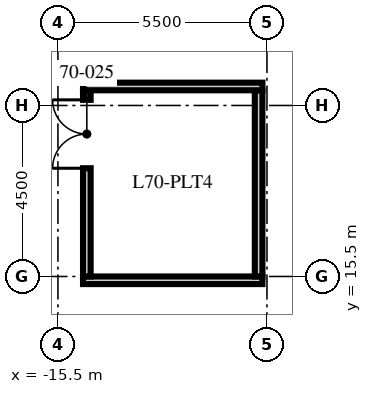
"""IFC4 building model, lengths in metres.
Left out: names, types, materials, properties, quantities, classifications, styles, units other than length and angle.
Written with IfcOpenShell. Run it as: python <this file> out.ifc"""

import sys

from ifc_helpers import new_model, si_unit, direction, frame, frame_2d, origin, origin_2d, place, context, subcontext, project, spatial, rectangle, extrude, element, fill, save


model = new_model("IFC4")
c1 = context("Model", 3, precision=1e-05, world=origin(), true_north=direction((0.0, 1.0)))
c2 = subcontext(c1, "Body", "Model", "MODEL_VIEW")
j1 = project(units=[si_unit("LENGTHUNIT", "METRE"), si_unit("PLANEANGLEUNIT", "RADIAN")], contexts=[c1])
p1 = place(None, origin())
s1 = spatial("IfcSite", under=j1, at=p1, CompositionType="ELEMENT")
p2 = place(p1, origin())
s2 = spatial("IfcBuilding", under=s1, at=p2, CompositionType="ELEMENT")
p3 = place(p2, frame((0.0, 0.0, 278.25)))
s3 = spatial("IfcBuildingStorey", under=s2, at=p3, CompositionType="ELEMENT", Elevation=278.25)
p4 = place(p3, frame((-16.64, 24.4, -0.65), z_axis=(0.203917129379, -0.327731366633, 0.922502008492), x_axis=(0.978988153279, 0.068255512614, -0.192154575114)))
e1 = element("IfcColumn", 1, at=p4, inside=s3, PredefinedType="COLUMN", context=c2, shape_type="SweptSolid", body=[
    extrude(rectangle(XDim=2.8, YDim=1.8, at=origin_2d()), origin(), (0.0, 0.0, 1.0), 8.238),
])
p5 = place(p3, frame((-8.32, 24.4, -0.65), z_axis=(0.103601510687, -0.332963994967, 0.937230870724), x_axis=(0.994618884766, 0.034712905596, -0.097612951251)))
e2 = element("IfcColumn", 2, at=p5, inside=s3, PredefinedType="COLUMN", context=c2, shape_type="SweptSolid", body=[
    extrude(rectangle(XDim=2.8, YDim=1.8, at=origin_2d()), origin(), (0.0, 0.0, 1.0), 8.109),
])
p6 = place(p3, frame((-14.84, 15.4, 0.0), z_axis=(0.0, 0.0, 1.0), x_axis=(1.0, 0.0, 0.0)))
e3 = element("IfcWall", 3, at=p6, inside=s3, PredefinedType="SOLIDWALL", context=c2, shape_type="SweptSolid", body=[
    extrude(rectangle(XDim=4.72, YDim=0.2, at=frame_2d((2.36, 0.0))), origin(), (0.0, 0.0, 1.0), 6.25),
])
p7 = place(p3, frame((-14.74, 15.5, 0.0), z_axis=(0.0, 0.0, 1.0), x_axis=(0.0, 1.0, 0.0)))
e4 = element("IfcWall", 4, at=p7, inside=s3, PredefinedType="SOLIDWALL", context=c2, shape_type="SweptSolid", body=[
    extrude(rectangle(XDim=4.9, YDim=0.2, at=frame_2d((2.45, 0.0))), origin(), (0.0, 0.0, 1.0), 6.25),
])
p8 = place(p7, frame((2.848, 0.0, 0.0)))
e5 = element("IfcOpeningElement", 5, at=p8, cuts=e4, PredefinedType="OPENING", context=c2, shape_type="SweptSolid", body=[
    extrude(rectangle(XDim=1.8, YDim=2.4, at=frame_2d((0.9, 1.2))), frame((0.0, 0.11, 0.0), z_axis=(0.0, -1.0, 0.0), x_axis=(1.0, 0.0, 0.0)), (0.0, 0.0, 1.0), 0.22),
])
p9 = place(p3, frame((-10.22, 15.5, 0.0), z_axis=(0.0, 0.0, 1.0), x_axis=(0.0, 1.0, 0.0)))
e6 = element("IfcWall", 6, at=p9, inside=s3, PredefinedType="SOLIDWALL", context=c2, shape_type="SweptSolid", body=[
    extrude(rectangle(XDim=4.9, YDim=0.2, at=frame_2d((2.45, 0.0))), origin(), (0.0, 0.0, 1.0), 7.25),
])
p10 = place(p3, frame((-14.84, 20.5, 0.0), z_axis=(0.0, 0.0, 1.0), x_axis=(1.0, 0.0, 0.0)))
e7 = element("IfcWall", 7, at=p10, inside=s3, PredefinedType="SOLIDWALL", context=c2, shape_type="SweptSolid", body=[
    extrude(rectangle(XDim=4.72, YDim=0.2, at=frame_2d((2.36, 0.0))), origin(), (0.0, 0.0, 1.0), 6.25),
])
p11 = place(p8, origin())
e8 = element("IfcDoor", 8, at=p11, inside=s3, OperationType="DOUBLE_DOOR_SINGLE_SWING", PredefinedType="DOOR", context=c2, shape_type="SweptSolid", body=[
    extrude(rectangle(XDim=1.8, YDim=2.4, at=frame_2d((0.9, 1.2))), frame((0.0, 0.025, 0.0), z_axis=(0.0, -1.0, 0.0), x_axis=(1.0, 0.0, 0.0)), (0.0, 0.0, 1.0), 0.05),
])
fill(e5, e8)
save(model, sys.argv[1])
